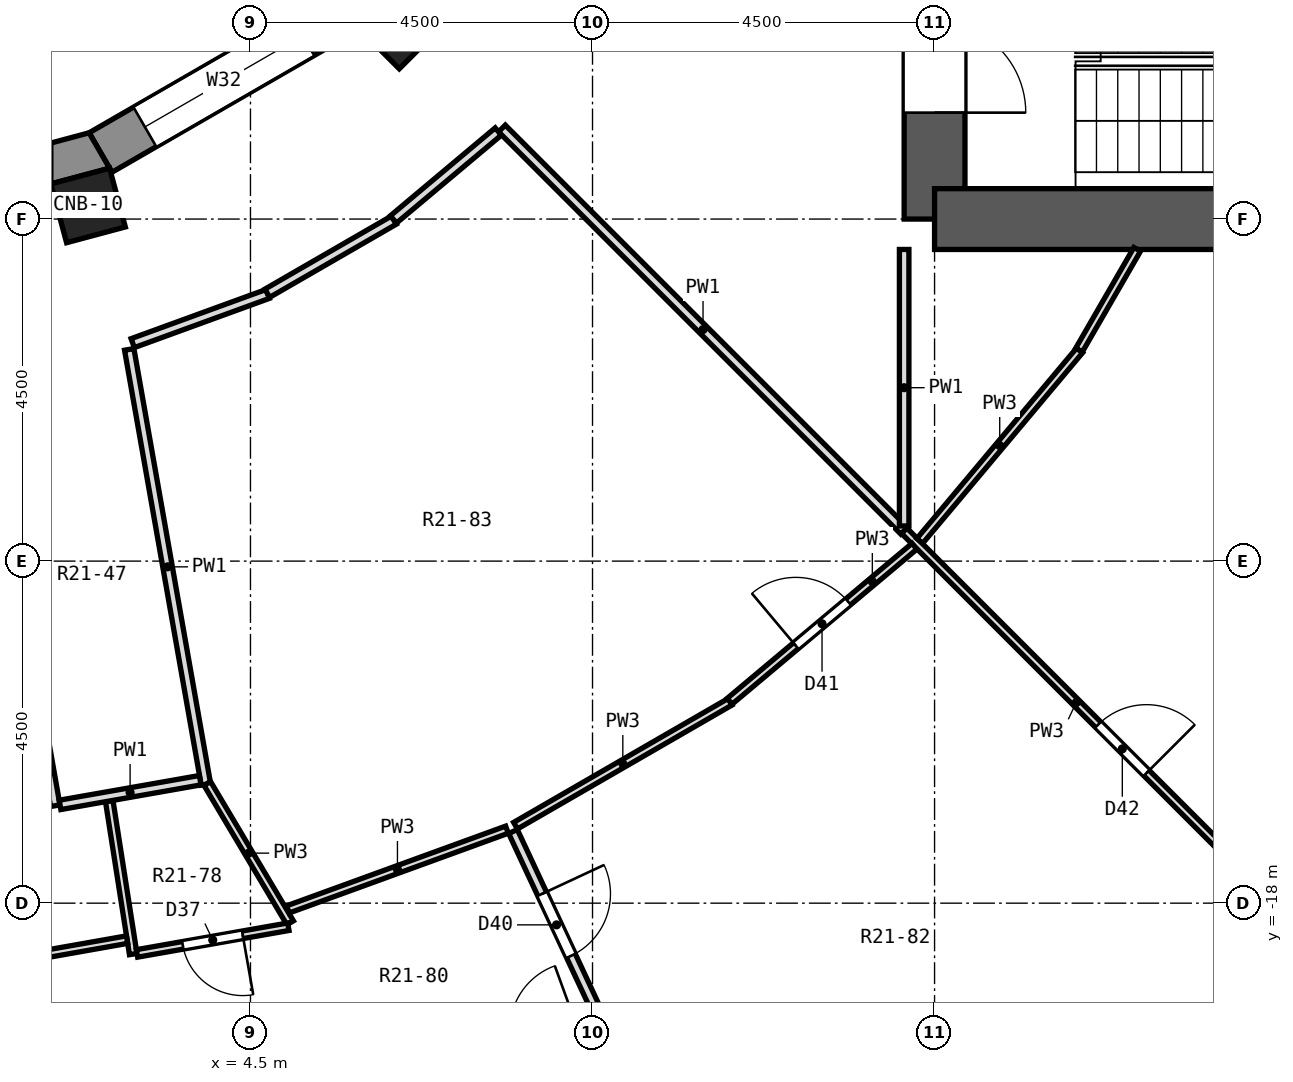
"""IFC4 building model, lengths in metres.
Left out: names, types, materials, properties, quantities, classifications, styles, units other than length and angle.
Written with IfcOpenShell. Run it as: python <this file> out.ifc"""

import sys

from ifc_helpers import new_model, si_unit, direction, frame, frame_2d, origin, origin_2d, place, context, subcontext, project, spatial, polyline, rectangle, outline, extrude, element, fill, save


model = new_model("IFC4")
c1 = context("Model", 3, precision=1e-05, world=origin(), true_north=direction((0.0, 1.0)))
c2 = subcontext(c1, "Body", "Model", "MODEL_VIEW")
j1 = project(units=[si_unit("LENGTHUNIT", "METRE"), si_unit("PLANEANGLEUNIT", "RADIAN")], contexts=[c1])
p1 = place(None, origin())
s1 = spatial("IfcSite", under=j1, at=p1, CompositionType="ELEMENT")
p2 = place(p1, origin())
s2 = spatial("IfcBuilding", under=s1, at=p2, CompositionType="ELEMENT")
p3 = place(p2, frame((0.0, 0.0, 131.5)))
s3 = spatial("IfcBuildingStorey", under=s2, at=p3, CompositionType="ELEMENT", Elevation=131.5)
for number, where, z_axis, x_axis in (
    (1, (2.364, -8.821, 0.0), (0.0, 0.0, 1.0), (0.259, -0.966, 0.0)),
    (2, (6.458, -6.458, 0.0), (0.0, 0.0, 1.0), (0.707, -0.707, 0.0)),
):
    element("IfcColumn", number, at=place(p3, frame(where, z_axis=z_axis, x_axis=x_axis)), inside=s3, PredefinedType="COLUMN", context=c2, shape_type="SweptSolid", body=[
        extrude(rectangle(XDim=0.8, YDim=0.8, at=origin_2d()), origin(), (0.0, 0.0, 1.0), 3.3),
    ])
p4 = place(p3, frame((13.5, -9.0, 0.0), z_axis=(0.0, 0.0, 1.0), x_axis=(0.0, 1.0, 0.0)))
e3 = element("IfcWall", 3, at=p4, inside=s3, PredefinedType="SHEAR", context=c2, shape_type="SweptSolid", body=[
    extrude(rectangle(XDim=18.0, YDim=0.8, at=frame_2d((9.0, 0.0))), origin(), (0.0, 0.0, 1.0), 3.3),
])
p5 = place(p4, frame((15.4, 0.0, 0.0)))
e4 = element("IfcOpeningElement", 4, at=p5, cuts=e3, PredefinedType="OPENING", context=c2, shape_type="SweptSolid", body=[
    extrude(rectangle(XDim=1.2, YDim=2.1, at=frame_2d((0.6, 1.05))), frame((0.0, 0.412, 0.0), z_axis=(0.0, -1.0, 0.0), x_axis=(1.0, 0.0, 0.0)), (0.0, 0.0, 1.0), 0.824),
])
p6 = place(p4, frame((1.4, 0.0, 0.0)))
e5 = element("IfcOpeningElement", 5, at=p6, cuts=e3, PredefinedType="OPENING", context=c2, shape_type="SweptSolid", body=[
    extrude(rectangle(XDim=1.2, YDim=2.1, at=frame_2d((0.6, 1.05))), frame((0.0, 0.412, 0.0), z_axis=(0.0, -1.0, 0.0), x_axis=(1.0, 0.0, 0.0)), (0.0, 0.0, 1.0), 0.824),
])
p7 = place(p4, frame((7.5, 0.0, 0.0)))
e6 = element("IfcOpeningElement", 6, at=p7, cuts=e3, PredefinedType="OPENING", context=c2, shape_type="SweptSolid", body=[
    extrude(rectangle(XDim=3.0, YDim=2.4, at=frame_2d((1.5, 1.2))), frame((0.0, 0.412, 0.0), z_axis=(0.0, -1.0, 0.0), x_axis=(1.0, 0.0, 0.0)), (0.0, 0.0, 1.0), 0.824),
])
p8 = place(p3, frame((13.5, -9.0, 0.0), z_axis=(0.0, 0.0, 1.0), x_axis=(1.0, 0.0, 0.0)))
e7 = element("IfcWall", 7, at=p8, inside=s3, PredefinedType="SHEAR", context=c2, shape_type="SweptSolid", body=[
    extrude(rectangle(XDim=10.4, YDim=0.8, at=frame_2d((5.2, 0.0))), origin(), (0.0, 0.0, 1.0), 3.3),
])
p9 = place(p3, frame((15.699, -21.547, 0.0), z_axis=(0.0, 0.0, 1.0), x_axis=(0.766055462616, 0.642774476932, 0.0)))
e8 = element("IfcWall", 8, at=p9, inside=s3, PredefinedType="SOLIDWALL", context=c2, shape_type="SweptSolid", body=[
    extrude(rectangle(XDim=3.648, YDim=0.6, at=frame_2d((1.824, 0.0))), origin(), (0.0, 0.0, 1.0), 2.8),
])
p10 = place(p9, frame((0.674, 0.0, 0.9)))
e9 = element("IfcOpeningElement", 9, at=p10, cuts=e8, PredefinedType="OPENING", context=c2, shape_type="SweptSolid", body=[
    extrude(rectangle(XDim=2.3, YDim=1.8, at=frame_2d((1.15, 0.9))), frame((0.0, 0.312, 0.0), z_axis=(0.0, -1.0, 0.0), x_axis=(1.0, 0.0, 0.0)), (0.0, 0.0, 1.0), 0.624),
])
p11 = place(p3, frame((2.527, -8.125, 0.0), z_axis=(0.0, 0.0, 1.0), x_axis=(0.86604563398, 0.499964958637, 0.0)))
e10 = element("IfcWall", 10, at=p11, inside=s3, PredefinedType="SOLIDWALL", context=c2, shape_type="SweptSolid", body=[
    extrude(rectangle(XDim=3.747, YDim=0.6, at=frame_2d((1.874, 0.0))), origin(), (0.0, 0.0, 1.0), 2.8),
])
p12 = place(p11, frame((0.674, 0.0, 0.9)))
e11 = element("IfcOpeningElement", 11, at=p12, cuts=e10, PredefinedType="OPENING", context=c2, shape_type="SweptSolid", body=[
    extrude(rectangle(XDim=2.4, YDim=1.8, at=frame_2d((1.2, 0.9))), frame((0.0, 0.312, 0.0), z_axis=(0.0, -1.0, 0.0), x_axis=(1.0, 0.0, 0.0)), (0.0, 0.0, 1.0), 0.624),
])
p13 = place(p3, origin())
e12 = element("IfcWall", 12, at=p13, inside=s3, PredefinedType="SOLIDWALL", context=c2, shape_type="SweptSolid", body=[
    extrude(outline(polyline([(2.646, -8.331), (2.377, -7.865), (1.874, -8.0), (1.874, -8.538), (2.646, -8.331)])), origin(), (0.0, 0.0, 1.0), 2.8),
])
p14 = place(p3, frame((2.642, -16.656, 0.0), z_axis=(0.0, 0.0, 1.0), x_axis=(0.154658266248, -0.987968026143, 0.0)))
e13 = element("IfcWall", 13, at=p14, inside=s3, PredefinedType="PARTITIONING", context=c2, shape_type="SweptSolid", body=[
    extrude(rectangle(XDim=2.038, YDim=0.1, at=frame_2d((1.019, 0.0))), origin(), (0.0, 0.0, 1.0), 2.8),
])
p15 = place(p3, frame((0.924, -11.0, 0.0), z_axis=(0.0, 0.0, 1.0), x_axis=(0.173576639114, -0.98482036451, 0.0)))
e14 = element("IfcWall", 14, at=p15, inside=s3, PredefinedType="PARTITIONING", context=c2, shape_type="SweptSolid", body=[
    extrude(rectangle(XDim=5.806, YDim=0.125, at=frame_2d((2.903, 0.0))), origin(), (0.0, 0.0, 1.0), 2.8),
])
p16 = place(p3, frame((2.905, -10.715, 0.0), z_axis=(0.0, 0.0, 1.0), x_axis=(0.173617542192, -0.984813154382, 0.0)))
e15 = element("IfcWall", 15, at=p16, inside=s3, PredefinedType="PARTITIONING", context=c2, shape_type="SweptSolid", body=[
    extrude(rectangle(XDim=5.81, YDim=0.125, at=frame_2d((2.905, 0.0))), origin(), (0.0, 0.0, 1.0), 2.8),
])
p17 = place(p3, frame((7.954, -17.057, 0.0), z_axis=(0.0, 0.0, 1.0), x_axis=(0.422662835783, -0.906287000485, 0.0)))
e16 = element("IfcWall", 16, at=p17, inside=s3, PredefinedType="PARTITIONING", context=c2, shape_type="SweptSolid", body=[
    extrude(rectangle(XDim=6.844, YDim=0.125, at=frame_2d((3.422, 0.0))), origin(), (0.0, 0.0, 1.0), 2.8),
])
p18 = place(p17, frame((0.905, 0.0, 0.0)))
e17 = element("IfcOpeningElement", 17, at=p18, cuts=e16, PredefinedType="OPENING", context=c2, shape_type="SweptSolid", body=[
    extrude(rectangle(XDim=0.9, YDim=2.1, at=frame_2d((0.45, 1.05))), frame((0.0, 0.074, 0.0), z_axis=(0.0, -1.0, 0.0), x_axis=(1.0, 0.0, 0.0)), (0.0, 0.0, 1.0), 0.149),
])
p19 = place(p3, frame((3.932, -16.426, 0.0), z_axis=(0.0, 0.0, 1.0), x_axis=(0.511292595627, -0.859406703288, 0.0)))
e18 = element("IfcWall", 18, at=p19, inside=s3, PredefinedType="PARTITIONING", context=c2, shape_type="SweptSolid", body=[
    extrude(rectangle(XDim=2.132, YDim=0.1, at=frame_2d((1.066, 0.0))), origin(), (0.0, 0.0, 1.0), 2.8),
])
p20 = place(p3, frame((13.1, -13.1, 0.0), z_axis=(0.0, 0.0, 1.0), x_axis=(0.707106781187, -0.707106781187, 0.0)))
e19 = element("IfcWall", 19, at=p20, inside=s3, PredefinedType="PARTITIONING", context=c2, shape_type="SweptSolid", body=[
    extrude(rectangle(XDim=7.139, YDim=0.1, at=frame_2d((3.569, 0.0))), origin(), (0.0, 0.0, 1.0), 2.8),
])
p21 = place(p20, frame((3.609, 0.0, 0.0)))
e20 = element("IfcOpeningElement", 20, at=p21, cuts=e19, PredefinedType="OPENING", context=c2, shape_type="SweptSolid", body=[
    extrude(rectangle(XDim=0.9, YDim=2.1, at=frame_2d((0.45, 1.05))), frame((0.0, 0.062, 0.0), z_axis=(0.0, -1.0, 0.0), x_axis=(1.0, 0.0, 0.0)), (0.0, 0.0, 1.0), 0.124),
])
p22 = place(p3, frame((7.808, -7.808, 0.0), z_axis=(0.0, 0.0, 1.0), x_axis=(0.707106781187, -0.707106781187, 0.0)))
e21 = element("IfcWall", 21, at=p22, inside=s3, PredefinedType="PARTITIONING", context=c2, shape_type="SweptSolid", body=[
    extrude(rectangle(XDim=7.484, YDim=0.125, at=frame_2d((3.742, 0.0))), origin(), (0.0, 0.0, 1.0), 2.8),
])
p23 = place(p3, frame((3.007, -18.661, 0.0), z_axis=(0.0, 0.0, 1.0), x_axis=(0.984806648716, 0.173654440325, 0.0)))
e22 = element("IfcWall", 22, at=p23, inside=s3, PredefinedType="PARTITIONING", context=c2, shape_type="SweptSolid", body=[
    extrude(rectangle(XDim=2.022, YDim=0.1, at=frame_2d((1.011, 0.0))), origin(), (0.0, 0.0, 1.0), 2.8),
])
p24 = place(p23, frame((0.612, 0.0, 0.0)))
e23 = element("IfcOpeningElement", 23, at=p24, cuts=e22, PredefinedType="OPENING", context=c2, shape_type="SweptSolid", body=[
    extrude(rectangle(XDim=0.8, YDim=2.1, at=frame_2d((0.4, 1.05))), frame((0.0, 0.062, 0.0), z_axis=(0.0, -1.0, 0.0), x_axis=(1.0, 0.0, 0.0)), (0.0, 0.0, 1.0), 0.124),
])
p25 = place(p3, frame((1.685, -18.69, 0.0), z_axis=(0.0, 0.0, 1.0), x_axis=(0.984742886049, 0.17401565555, 0.0)))
e24 = element("IfcWall", 24, at=p25, inside=s3, PredefinedType="PARTITIONING", context=c2, shape_type="SweptSolid", body=[
    extrude(rectangle(XDim=1.209, YDim=0.1, at=frame_2d((0.605, 0.0))), origin(), (0.0, 0.0, 1.0), 2.8),
])
p26 = place(p3, frame((1.995, -16.707, 0.0), z_axis=(0.0, 0.0, 1.0), x_axis=(0.984821606563, 0.173569591941, 0.0)))
e25 = element("IfcWall", 25, at=p26, inside=s3, PredefinedType="PARTITIONING", context=c2, shape_type="SweptSolid", body=[
    extrude(rectangle(XDim=1.872, YDim=0.125, at=frame_2d((0.936, 0.0))), origin(), (0.0, 0.0, 1.0), 2.8),
])
p27 = place(p3, frame((4.992, -18.082, 0.0), z_axis=(0.0, 0.0, 1.0), x_axis=(0.939709725343, 0.341973145284, 0.0)))
e26 = element("IfcWall", 26, at=p27, inside=s3, PredefinedType="PARTITIONING", context=c2, shape_type="SweptSolid", body=[
    extrude(rectangle(XDim=3.067, YDim=0.1, at=frame_2d((1.533, 0.0))), origin(), (0.0, 0.0, 1.0), 2.8),
])
p28 = place(p3, frame((2.951, -10.632, 0.0), z_axis=(0.0, 0.0, 1.0), x_axis=(0.939616011167, 0.342230553222, 0.0)))
e27 = element("IfcWall", 27, at=p28, inside=s3, PredefinedType="PARTITIONING", context=c2, shape_type="SweptSolid", body=[
    extrude(rectangle(XDim=1.89, YDim=0.125, at=frame_2d((0.945, 0.0))), origin(), (0.0, 0.0, 1.0), 2.8),
])
p29 = place(p3, frame((7.987, -16.981, 0.0), z_axis=(0.0, 0.0, 1.0), x_axis=(0.865989766624, 0.500061720293, 0.0)))
e28 = element("IfcWall", 28, at=p29, inside=s3, PredefinedType="PARTITIONING", context=c2, shape_type="SweptSolid", body=[
    extrude(rectangle(XDim=3.26, YDim=0.1, at=frame_2d((1.63, 0.0))), origin(), (0.0, 0.0, 1.0), 2.8),
])
p30 = place(p3, frame((4.721, -9.976, 0.0), z_axis=(0.0, 0.0, 1.0), x_axis=(0.865946867621, 0.500136003959, 0.0)))
e29 = element("IfcWall", 29, at=p30, inside=s3, PredefinedType="PARTITIONING", context=c2, shape_type="SweptSolid", body=[
    extrude(rectangle(XDim=1.925, YDim=0.125, at=frame_2d((0.962, 0.0))), origin(), (0.0, 0.0, 1.0), 2.8),
])
p31 = place(p3, frame((10.804, -15.344, 0.0), z_axis=(0.0, 0.0, 1.0), x_axis=(0.766167094934, 0.642641410618, 0.0)))
e30 = element("IfcWall", 30, at=p31, inside=s3, PredefinedType="PARTITIONING", context=c2, shape_type="SweptSolid", body=[
    extrude(rectangle(XDim=3.172, YDim=0.1, at=frame_2d((1.586, 0.0))), origin(), (0.0, 0.0, 1.0), 2.8),
])
p32 = place(p31, frame((1.136, 0.0, 0.0)))
e31 = element("IfcOpeningElement", 31, at=p32, cuts=e30, PredefinedType="OPENING", context=c2, shape_type="SweptSolid", body=[
    extrude(rectangle(XDim=0.9, YDim=2.1, at=frame_2d((0.45, 1.05))), frame((0.0, 0.062, 0.0), z_axis=(0.0, -1.0, 0.0), x_axis=(1.0, 0.0, 0.0)), (0.0, 0.0, 1.0), 0.124),
])
p33 = place(p3, frame((6.381, -9.005, 0.0), z_axis=(0.0, 0.0, 1.0), x_axis=(0.766182926266, 0.642622535785, 0.0)))
e32 = element("IfcWall", 32, at=p33, inside=s3, PredefinedType="PARTITIONING", context=c2, shape_type="SweptSolid", body=[
    extrude(rectangle(XDim=1.8, YDim=0.125, at=frame_2d((0.9, 0.0))), origin(), (0.0, 0.0, 1.0), 2.8),
])
p34 = place(p3, frame((13.305, -13.235, 0.0), z_axis=(0.0, 0.0, 1.0), x_axis=(0.642682886784, 0.766132303871, 0.0)))
e33 = element("IfcWall", 33, at=p34, inside=s3, PredefinedType="PARTITIONING", context=c2, shape_type="SweptSolid", body=[
    extrude(rectangle(XDim=3.273, YDim=0.1, at=frame_2d((1.636, 0.0))), origin(), (0.0, 0.0, 1.0), 2.8),
])
p35 = place(p3, frame((15.401, -10.723, 0.0), z_axis=(0.0, 0.0, 1.0), x_axis=(0.500035603698, 0.866004847004, 0.0)))
e34 = element("IfcWall", 34, at=p35, inside=s3, PredefinedType="PARTITIONING", context=c2, shape_type="SweptSolid", body=[
    extrude(rectangle(XDim=1.53, YDim=0.1, at=frame_2d((0.765, 0.0))), origin(), (0.0, 0.0, 1.0), 2.8),
])
p36 = place(p3, frame((13.1, -13.038, 0.0), z_axis=(0.0, 0.0, 1.0), x_axis=(0.0, 1.0, 0.0)))
e35 = element("IfcWall", 35, at=p36, inside=s3, PredefinedType="PARTITIONING", context=c2, shape_type="SweptSolid", body=[
    extrude(rectangle(XDim=3.638, YDim=0.125, at=frame_2d((1.819, 0.0))), origin(), (0.0, 0.0, 1.0), 2.8),
])
p37 = place(p12, origin())
e36 = element("IfcWindow", 36, at=p37, inside=s3, PartitioningType="SINGLE_PANEL", PredefinedType="WINDOW", context=c2, shape_type="SweptSolid", body=[
    extrude(rectangle(XDim=2.4, YDim=1.8, at=frame_2d((1.2, 0.9))), frame((0.0, -0.12, 0.0), z_axis=(0.0, -1.0, 0.0), x_axis=(1.0, 0.0, 0.0)), (0.0, 0.0, 1.0), 0.06),
])
fill(e11, e36)
p38 = place(p24, frame((0.8, 0.0, 0.0), z_axis=(0.0, 0.0, 1.0), x_axis=(-1.0, 0.0, 0.0)))
e37 = element("IfcDoor", 37, at=p38, inside=s3, OperationType="SINGLE_SWING_LEFT", PredefinedType="DOOR", context=c2, shape_type="SweptSolid", body=[
    extrude(rectangle(XDim=0.8, YDim=2.1, at=frame_2d((0.4, 1.05))), frame((0.0, 0.025, 0.0), z_axis=(0.0, -1.0, 0.0), x_axis=(1.0, 0.0, 0.0)), (0.0, 0.0, 1.0), 0.05),
])
fill(e23, e37)
p39 = place(p18, origin())
e38 = element("IfcDoor", 38, at=p39, inside=s3, OperationType="SINGLE_SWING_LEFT", PredefinedType="DOOR", context=c2, shape_type="SweptSolid", body=[
    extrude(rectangle(XDim=0.9, YDim=2.1, at=frame_2d((0.45, 1.05))), frame((0.0, 0.025, 0.0), z_axis=(0.0, -1.0, 0.0), x_axis=(1.0, 0.0, 0.0)), (0.0, 0.0, 1.0), 0.05),
])
fill(e17, e38)
p40 = place(p32, origin())
e39 = element("IfcDoor", 39, at=p40, inside=s3, OperationType="SINGLE_SWING_LEFT", PredefinedType="DOOR", context=c2, shape_type="SweptSolid", body=[
    extrude(rectangle(XDim=0.9, YDim=2.1, at=frame_2d((0.45, 1.05))), frame((0.0, 0.025, 0.0), z_axis=(0.0, -1.0, 0.0), x_axis=(1.0, 0.0, 0.0)), (0.0, 0.0, 1.0), 0.05),
])
fill(e31, e39)
p41 = place(p21, origin())
e40 = element("IfcDoor", 40, at=p41, inside=s3, OperationType="SINGLE_SWING_RIGHT", PredefinedType="DOOR", context=c2, shape_type="SweptSolid", body=[
    extrude(rectangle(XDim=0.9, YDim=2.1, at=frame_2d((0.45, 1.05))), frame((0.0, 0.025, 0.0), z_axis=(0.0, -1.0, 0.0), x_axis=(1.0, 0.0, 0.0)), (0.0, 0.0, 1.0), 0.05),
])
fill(e20, e40)
p42 = place(p6, frame((1.2, 0.0, 0.0), z_axis=(0.0, 0.0, 1.0), x_axis=(-1.0, 0.0, 0.0)))
e41 = element("IfcDoor", 41, at=p42, inside=s3, OperationType="SINGLE_SWING_RIGHT", PredefinedType="DOOR", context=c2, shape_type="SweptSolid", body=[
    extrude(rectangle(XDim=1.2, YDim=2.1, at=frame_2d((0.6, 1.05))), frame((0.0, 0.025, 0.0), z_axis=(0.0, -1.0, 0.0), x_axis=(1.0, 0.0, 0.0)), (0.0, 0.0, 1.0), 0.05),
])
fill(e5, e41)
save(model, sys.argv[1])
